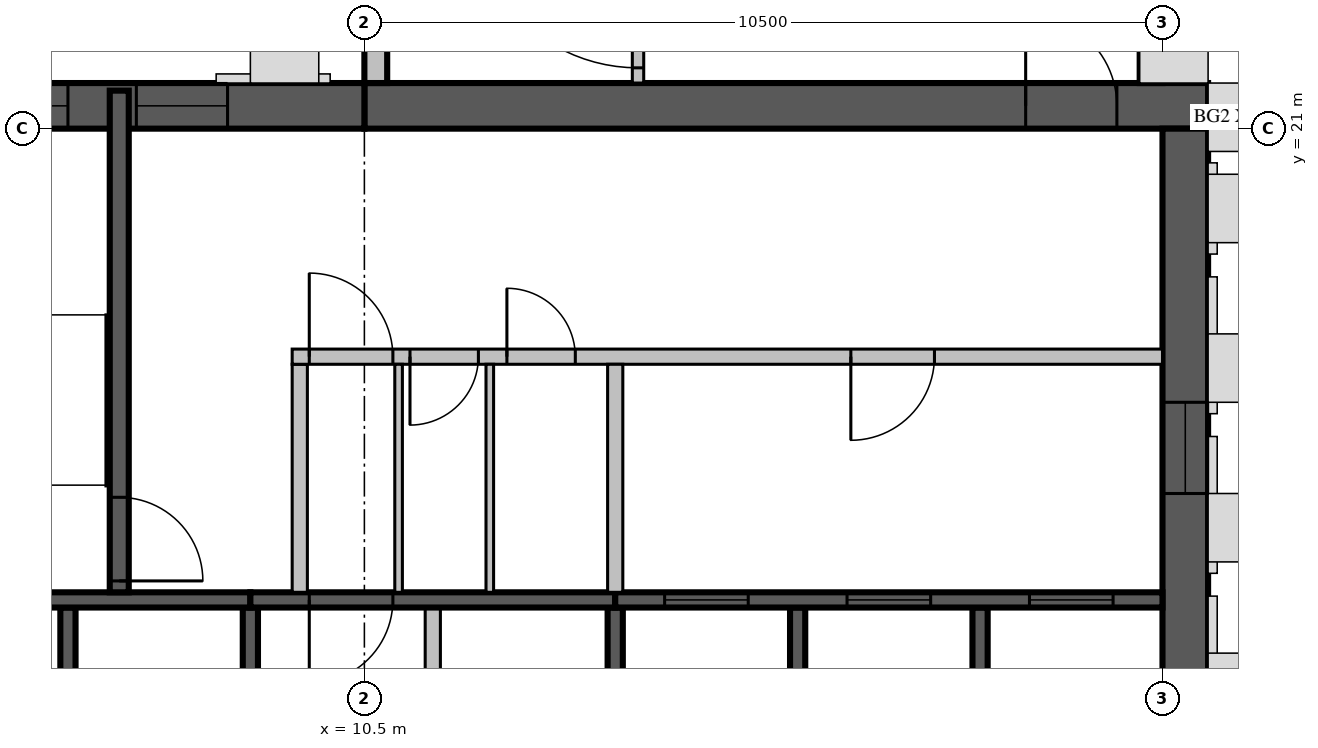
"""IFC4 building model, lengths in metres.
Left out: names, types, materials, properties, quantities, classifications, styles, units other than length and angle.
Written with IfcOpenShell. Run it as: python <this file> out.ifc"""

import sys

from ifc_helpers import new_model, si_unit, direction, frame, frame_2d, origin, place, context, subcontext, project, spatial, rectangle, extrude, source, transform, mapped, element, fill, save


model = new_model("IFC4")
c1 = context("Model", 3, precision=1e-05, world=origin(), true_north=direction((0.0, 1.0)))
c2 = subcontext(c1, "Body", "Model", "MODEL_VIEW")
j1 = project(units=[si_unit("LENGTHUNIT", "METRE"), si_unit("PLANEANGLEUNIT", "RADIAN")], contexts=[c1])
p1 = place(None, origin())
s1 = spatial("IfcSite", under=j1, at=p1, CompositionType="ELEMENT")
p2 = place(p1, origin())
s2 = spatial("IfcBuilding", under=s1, at=p2, CompositionType="ELEMENT")
p3 = place(p2, frame((0.0, 0.0, 333.5)))
s3 = spatial("IfcBuildingStorey", under=s2, at=p3, CompositionType="ELEMENT", Elevation=333.5)
m1 = source(origin(), c2, "Body", "SweptSolid", [
    extrude(rectangle(XDim=11.1, YDim=0.6, at=frame_2d((5.55, 0.0))), origin(), (0.0, 0.0, 1.0), 3.5),
])
p4 = place(p3, frame((10.5, 21.3, 0.0), z_axis=(0.0, 0.0, 1.0), x_axis=(1.0, 0.0, 0.0)))
e1 = element("IfcWall", 1, at=p4, inside=s3, PredefinedType="SHEAR", context=c2, shape_type="MappedRepresentation", body=[
    mapped(m1, transform((0.0, 0.0, 0.0), scale=1.0)),
])
m2 = source(origin(), c2, "Body", "SweptSolid", [
    extrude(rectangle(XDim=1.2, YDim=2.1, at=frame_2d((0.6, 1.05))), frame((0.0, 0.31, 0.0), z_axis=(0.0, -1.0, 0.0), x_axis=(1.0, 0.0, 0.0)), (0.0, 0.0, 1.0), 0.62),
])
p5 = place(p4, frame((8.7, 0.0, 0.0)))
e2 = element("IfcOpeningElement", 2, at=p5, cuts=e1, PredefinedType="OPENING", context=c2, shape_type="MappedRepresentation", body=[
    mapped(m2, transform((0.0, 0.0, 0.0), scale=1.0)),
])
p6 = place(p3, frame((21.3, 4.2, 0.0), z_axis=(0.0, 0.0, 1.0), x_axis=(0.0, 1.0, 0.0)))
e3 = element("IfcWall", 3, at=p6, inside=s3, PredefinedType="SHEAR", context=c2, shape_type="SweptSolid", body=[
    extrude(rectangle(XDim=16.8, YDim=0.6, at=frame_2d((8.4, 0.0))), origin(), (0.0, 0.0, 1.0), 3.5),
])
p7 = place(p6, frame((4.2, 0.0, 0.0)))
e4 = element("IfcOpeningElement", 4, at=p7, cuts=e3, PredefinedType="OPENING", context=c2, shape_type="MappedRepresentation", body=[
    mapped(m2, transform((0.0, 0.0, 0.0), scale=1.0)),
])
m3 = source(origin(), c2, "Body", "SweptSolid", [
    extrude(rectangle(XDim=1.2, YDim=2.4, at=frame_2d((0.6, 1.2))), frame((0.0, 0.31, 0.0), z_axis=(0.0, -1.0, 0.0), x_axis=(1.0, 0.0, 0.0)), (0.0, 0.0, 1.0), 0.62),
])
p8 = place(p6, frame((12.0, 0.0, 0.6)))
e5 = element("IfcOpeningElement", 5, at=p8, cuts=e3, PredefinedType="OPENING", context=c2, shape_type="MappedRepresentation", body=[
    mapped(m3, transform((0.0, 0.0, 0.0), scale=1.0)),
])
m4 = source(origin(), c2, "Body", "SweptSolid", [
    extrude(rectangle(XDim=6.6, YDim=0.6, at=frame_2d((3.3, 0.0))), origin(), (0.0, 0.0, 1.0), 3.5),
])
p9 = place(p3, frame((3.9, 21.3, 0.0), z_axis=(0.0, 0.0, 1.0), x_axis=(1.0, 0.0, 0.0)))
e6 = element("IfcWall", 6, at=p9, inside=s3, PredefinedType="SHEAR", context=c2, shape_type="MappedRepresentation", body=[
    mapped(m4, transform((0.0, 0.0, 0.0), scale=1.0)),
])
p10 = place(p9, frame((1.5, 0.0, 0.6)))
e7 = element("IfcOpeningElement", 7, at=p10, cuts=e6, PredefinedType="OPENING", context=c2, shape_type="MappedRepresentation", body=[
    mapped(m3, transform((0.0, 0.0, 0.0), scale=1.0)),
])
p11 = place(p9, frame((3.6, 0.0, 0.6)))
e8 = element("IfcOpeningElement", 8, at=p11, cuts=e6, PredefinedType="OPENING", context=c2, shape_type="MappedRepresentation", body=[
    mapped(m3, transform((0.0, 0.0, 0.0), scale=1.0)),
])
m5 = source(origin(), c2, "Body", "SweptSolid", [
    extrude(rectangle(XDim=7.5, YDim=0.3, at=frame_2d((3.75, 0.0))), origin(), (0.0, 0.0, 1.0), 3.1),
])
p12 = place(p3, frame((20.85, 21.6, 0.0), z_axis=(0.0, 0.0, 1.0), x_axis=(0.0, 1.0, 0.0)))
e9 = element("IfcWall", 9, at=p12, inside=s3, PredefinedType="STANDARD", context=c2, shape_type="MappedRepresentation", body=[
    mapped(m5, transform((0.0, 0.0, 0.0), scale=1.0)),
])
m6 = source(origin(), c2, "Body", "SweptSolid", [
    extrude(rectangle(XDim=1.8, YDim=2.0, at=frame_2d((0.9, 1.0))), frame((0.0, 0.16, 0.0), z_axis=(0.0, -1.0, 0.0), x_axis=(1.0, 0.0, 0.0)), (0.0, 0.0, 1.0), 0.32),
])
p13 = place(p12, frame((0.463, 0.0, 0.6)))
e10 = element("IfcOpeningElement", 10, at=p13, cuts=e9, PredefinedType="OPENING", context=c2, shape_type="MappedRepresentation", body=[
    mapped(m6, transform((0.0, 0.0, 0.0), scale=1.0)),
])
m7 = source(origin(), c2, "Body", "SweptSolid", [
    extrude(rectangle(XDim=3.0, YDim=2.0, at=frame_2d((1.5, 1.0))), frame((0.0, 0.16, 0.0), z_axis=(0.0, -1.0, 0.0), x_axis=(1.0, 0.0, 0.0)), (0.0, 0.0, 1.0), 0.32),
])
p14 = place(p12, frame((4.2, 0.0, 0.6)))
e11 = element("IfcOpeningElement", 11, at=p14, cuts=e9, PredefinedType="OPENING", context=c2, shape_type="MappedRepresentation", body=[
    mapped(m7, transform((0.0, 0.0, 0.0), scale=1.0)),
])
p15 = place(p3, frame((10.65, 29.1, 0.0), z_axis=(0.0, 0.0, 1.0), x_axis=(0.0, -1.0, 0.0)))
e12 = element("IfcWall", 12, at=p15, inside=s3, PredefinedType="STANDARD", context=c2, shape_type="MappedRepresentation", body=[
    mapped(m5, transform((0.0, 0.0, 0.0), scale=1.0)),
])
m8 = source(origin(), c2, "Body", "SweptSolid", [
    extrude(rectangle(XDim=3.6, YDim=2.0, at=frame_2d((1.8, 1.0))), frame((0.0, 0.16, 0.0), z_axis=(0.0, -1.0, 0.0), x_axis=(1.0, 0.0, 0.0)), (0.0, 0.0, 1.0), 0.32),
])
p16 = place(p15, frame((3.36, 0.0, 0.6)))
e13 = element("IfcOpeningElement", 13, at=p16, cuts=e12, PredefinedType="OPENING", context=c2, shape_type="MappedRepresentation", body=[
    mapped(m8, transform((0.0, 0.0, 0.0), scale=1.0)),
])
m9 = source(origin(), c2, "Body", "SweptSolid", [
    extrude(rectangle(XDim=2.4, YDim=2.0, at=frame_2d((1.2, 1.0))), frame((0.0, 0.16, 0.0), z_axis=(0.0, -1.0, 0.0), x_axis=(1.0, 0.0, 0.0)), (0.0, 0.0, 1.0), 0.32),
])
p17 = place(p15, frame((0.48, 0.0, 0.6)))
e14 = element("IfcOpeningElement", 14, at=p17, cuts=e12, PredefinedType="OPENING", context=c2, shape_type="MappedRepresentation", body=[
    mapped(m9, transform((0.0, 0.0, 0.0), scale=1.0)),
])
m10 = source(origin(), c2, "Body", "SweptSolid", [
    extrude(rectangle(XDim=3.0, YDim=0.2, at=frame_2d((1.5, 0.0))), origin(), (0.0, 0.0, 1.0), 3.5),
])
p18 = place(p3, frame((6.6, 11.7, 0.0), z_axis=(0.0, 0.0, 1.0), x_axis=(0.0, 1.0, 0.0)))
e15 = element("IfcWall", 15, at=p18, inside=s3, PredefinedType="SOLIDWALL", context=c2, shape_type="MappedRepresentation", body=[
    mapped(m10, transform((0.0, 0.0, 0.0), scale=1.0)),
])
m11 = source(origin(), c2, "Body", "SweptSolid", [
    extrude(rectangle(XDim=3.0, YDim=0.2, at=frame_2d((1.5, 0.0))), origin(), (0.0, 0.0, 1.0), 3.1),
])
for number, where, z_axis, x_axis in (
    (16, (9.0, 11.7, 0.0), (0.0, 0.0, 1.0), (0.0, 1.0, 0.0)),
    (17, (13.8, 11.7, 0.0), (0.0, 0.0, 1.0), (0.0, 1.0, 0.0)),
):
    element("IfcWall", number, at=place(p3, frame(where, z_axis=z_axis, x_axis=x_axis)), inside=s3, PredefinedType="SOLIDWALL", context=c2, shape_type="MappedRepresentation", body=[
        mapped(m11, transform((0.0, 0.0, 0.0), scale=1.0)),
    ])
for number, where, z_axis, x_axis in (
    (18, (16.2, 11.7, 0.0), (0.0, 0.0, 1.0), (0.0, 1.0, 0.0)),
    (19, (18.6, 11.7, 0.0), (0.0, 0.0, 1.0), (0.0, 1.0, 0.0)),
):
    element("IfcWall", number, at=place(p3, frame(where, z_axis=z_axis, x_axis=x_axis)), inside=s3, PredefinedType="SOLIDWALL", context=c2, shape_type="MappedRepresentation", body=[
        mapped(m10, transform((0.0, 0.0, 0.0), scale=1.0)),
    ])
m12 = source(origin(), c2, "Body", "SweptSolid", [
    extrude(rectangle(XDim=3.0, YDim=0.2, at=frame_2d((1.5, 0.0))), origin(), (0.0, 0.0, 1.0), 3.1),
])
p19 = place(p3, frame((11.4, 11.7, 0.0), z_axis=(0.0, 0.0, 1.0), x_axis=(0.0, 1.0, 0.0)))
e20 = element("IfcWall", 20, at=p19, inside=s3, PredefinedType="PARTITIONING", context=c2, shape_type="MappedRepresentation", body=[
    mapped(m12, transform((0.0, 0.0, 0.0), scale=1.0)),
])
m13 = source(origin(), c2, "Body", "SweptSolid", [
    extrude(rectangle(XDim=4.8, YDim=0.2, at=frame_2d((2.4, 0.0))), origin(), (0.0, 0.0, 1.0), 3.5),
])
p20 = place(p3, frame((4.2, 14.8, 0.0), z_axis=(0.0, 0.0, 1.0), x_axis=(1.0, 0.0, 0.0)))
e21 = element("IfcWall", 21, at=p20, inside=s3, PredefinedType="SOLIDWALL", context=c2, shape_type="MappedRepresentation", body=[
    mapped(m13, transform((0.0, 0.0, 0.0), scale=1.0)),
])
m14 = source(origin(), c2, "Body", "SweptSolid", [
    extrude(rectangle(XDim=4.8, YDim=0.2, at=frame_2d((2.4, 0.0))), origin(), (0.0, 0.0, 1.0), 3.1),
])
p21 = place(p3, frame((9.0, 14.8, 0.0), z_axis=(0.0, 0.0, 1.0), x_axis=(1.0, 0.0, 0.0)))
e22 = element("IfcWall", 22, at=p21, inside=s3, PredefinedType="SOLIDWALL", context=c2, shape_type="MappedRepresentation", body=[
    mapped(m14, transform((0.0, 0.0, 0.0), scale=1.0)),
])
m15 = source(origin(), c2, "Body", "SweptSolid", [
    extrude(rectangle(XDim=1.1, YDim=2.1, at=frame_2d((0.55, 1.05))), frame((0.0, 0.11, 0.0), z_axis=(0.0, -1.0, 0.0), x_axis=(1.0, 0.0, 0.0)), (0.0, 0.0, 1.0), 0.22),
])
p22 = place(p21, frame((0.775, 0.0, 0.0)))
e23 = element("IfcOpeningElement", 23, at=p22, cuts=e22, PredefinedType="OPENING", context=c2, shape_type="MappedRepresentation", body=[
    mapped(m15, transform((0.0, 0.0, 0.0), scale=1.0)),
])
m16 = source(origin(), c2, "Body", "SweptSolid", [
    extrude(rectangle(XDim=7.2, YDim=0.2, at=frame_2d((3.6, 0.0))), origin(), (0.0, 0.0, 1.0), 3.5),
])
p23 = place(p3, frame((13.8, 14.8, 0.0), z_axis=(0.0, 0.0, 1.0), x_axis=(1.0, 0.0, 0.0)))
e24 = element("IfcWall", 24, at=p23, inside=s3, PredefinedType="SOLIDWALL", context=c2, shape_type="MappedRepresentation", body=[
    mapped(m16, transform((0.0, 0.0, 0.0), scale=1.0)),
])
p24 = place(p23, frame((0.65, 0.0, 0.0)))
e25 = element("IfcOpeningElement", 25, at=p24, cuts=e24, PredefinedType="OPENING", context=c2, shape_type="MappedRepresentation", body=[
    mapped(m15, transform((0.0, 0.0, 0.0), scale=1.0)),
])
p25 = place(p23, frame((3.05, 0.0, 0.0)))
e26 = element("IfcOpeningElement", 26, at=p25, cuts=e24, PredefinedType="OPENING", context=c2, shape_type="MappedRepresentation", body=[
    mapped(m15, transform((0.0, 0.0, 0.0), scale=1.0)),
])
p26 = place(p23, frame((5.45, 0.0, 0.0)))
e27 = element("IfcOpeningElement", 27, at=p26, cuts=e24, PredefinedType="OPENING", context=c2, shape_type="MappedRepresentation", body=[
    mapped(m15, transform((0.0, 0.0, 0.0), scale=1.0)),
])
m17 = source(origin(), c2, "Body", "SweptSolid", [
    extrude(rectangle(XDim=6.6, YDim=0.25, at=frame_2d((3.3, 0.0))), origin(), (0.0, 0.0, 1.0), 3.1),
])
p27 = place(p3, frame((7.275, 14.9, 0.0), z_axis=(0.0, 0.0, 1.0), x_axis=(0.0, 1.0, 0.0)))
e28 = element("IfcWall", 28, at=p27, inside=s3, PredefinedType="SOLIDWALL", context=c2, shape_type="MappedRepresentation", body=[
    mapped(m17, transform((0.0, 0.0, 0.0), scale=1.0)),
])
m18 = source(origin(), c2, "Body", "SweptSolid", [
    extrude(rectangle(XDim=1.1, YDim=2.1, at=frame_2d((0.55, 1.05))), frame((0.0, 0.135, 0.0), z_axis=(0.0, -1.0, 0.0), x_axis=(1.0, 0.0, 0.0)), (0.0, 0.0, 1.0), 0.27),
])
p28 = place(p27, frame((0.15, 0.0, 0.0)))
e29 = element("IfcOpeningElement", 29, at=p28, cuts=e28, PredefinedType="OPENING", context=c2, shape_type="MappedRepresentation", body=[
    mapped(m18, transform((0.0, 0.0, 0.0), scale=1.0)),
])
p29 = place(p3, frame((9.65, 14.9, 0.0), z_axis=(0.0, 0.0, 1.0), x_axis=(0.0, 1.0, 0.0)))
e30 = element("IfcWall", 30, at=p29, inside=s3, PredefinedType="PARTITIONING", context=c2, shape_type="MappedRepresentation", body=[
    mapped(m12, transform((0.0, 0.0, 0.0), scale=1.0)),
])
m19 = source(origin(), c2, "Body", "SweptSolid", [
    extrude(rectangle(XDim=11.45, YDim=0.2, at=frame_2d((5.725, 0.0))), origin(), (0.0, 0.0, 1.0), 3.1),
])
p30 = place(p3, frame((9.55, 18.0, 0.0), z_axis=(0.0, 0.0, 1.0), x_axis=(1.0, 0.0, 0.0)))
e31 = element("IfcWall", 31, at=p30, inside=s3, PredefinedType="PARTITIONING", context=c2, shape_type="MappedRepresentation", body=[
    mapped(m19, transform((0.0, 0.0, 0.0), scale=1.0)),
])
p31 = place(p30, frame((0.225, 0.0, 0.0)))
e32 = element("IfcOpeningElement", 32, at=p31, cuts=e31, PredefinedType="OPENING", context=c2, shape_type="MappedRepresentation", body=[
    mapped(m15, transform((0.0, 0.0, 0.0), scale=1.0)),
])
m20 = source(origin(), c2, "Body", "SweptSolid", [
    extrude(rectangle(XDim=0.9, YDim=2.1, at=frame_2d((0.45, 1.05))), frame((0.0, 0.11, 0.0), z_axis=(0.0, -1.0, 0.0), x_axis=(1.0, 0.0, 0.0)), (0.0, 0.0, 1.0), 0.22),
])
p32 = place(p30, frame((1.55, 0.0, 0.0)))
e33 = element("IfcOpeningElement", 33, at=p32, cuts=e31, PredefinedType="OPENING", context=c2, shape_type="MappedRepresentation", body=[
    mapped(m20, transform((0.0, 0.0, 0.0), scale=1.0)),
])
p33 = place(p30, frame((2.825, 0.0, 0.0)))
e34 = element("IfcOpeningElement", 34, at=p33, cuts=e31, PredefinedType="OPENING", context=c2, shape_type="MappedRepresentation", body=[
    mapped(m20, transform((0.0, 0.0, 0.0), scale=1.0)),
])
p34 = place(p30, frame((7.35, 0.0, 0.0)))
e35 = element("IfcOpeningElement", 35, at=p34, cuts=e31, PredefinedType="OPENING", context=c2, shape_type="MappedRepresentation", body=[
    mapped(m15, transform((0.0, 0.0, 0.0), scale=1.0)),
])
p35 = place(p3, frame((13.8, 14.9, 0.0), z_axis=(0.0, 0.0, 1.0), x_axis=(0.0, 1.0, 0.0)))
e36 = element("IfcWall", 36, at=p35, inside=s3, PredefinedType="PARTITIONING", context=c2, shape_type="MappedRepresentation", body=[
    mapped(m12, transform((0.0, 0.0, 0.0), scale=1.0)),
])
m21 = source(origin(), c2, "Body", "SweptSolid", [
    extrude(rectangle(XDim=3.0, YDim=0.1, at=frame_2d((1.5, 0.0))), origin(), (0.0, 0.0, 1.0), 3.1),
])
for number, where, z_axis, x_axis in (
    (37, (10.95, 14.9, 0.0), (0.0, 0.0, 1.0), (0.0, 1.0, 0.0)),
    (38, (12.15, 14.9, 0.0), (0.0, 0.0, 1.0), (0.0, 1.0, 0.0)),
):
    element("IfcWall", number, at=place(p3, frame(where, z_axis=z_axis, x_axis=x_axis)), inside=s3, PredefinedType="PARTITIONING", context=c2, shape_type="MappedRepresentation", body=[
        mapped(m21, transform((0.0, 0.0, 0.0), scale=1.0)),
    ])
m22 = source(origin(), c2, "Body", "SweptSolid", [
    extrude(rectangle(XDim=7.725, YDim=0.15, at=frame_2d((3.862, 0.0))), origin(), (0.0, 0.0, 1.0), 3.1),
])
p36 = place(p3, frame((14.1, 29.325, 0.0), z_axis=(0.0, 0.0, 1.0), x_axis=(0.0, -1.0, 0.0)))
e39 = element("IfcWall", 39, at=p36, inside=s3, PredefinedType="PARTITIONING", context=c2, shape_type="MappedRepresentation", body=[
    mapped(m22, transform((0.0, 0.0, 0.0), scale=1.0)),
])
m23 = source(origin(), c2, "Body", "SweptSolid", [
    extrude(rectangle(XDim=2.2, YDim=2.1, at=frame_2d((1.1, 1.05))), frame((0.0, 0.085, 0.0), z_axis=(0.0, -1.0, 0.0), x_axis=(1.0, 0.0, 0.0)), (0.0, 0.0, 1.0), 0.17),
])
p37 = place(p36, frame((5.325, 0.0, 0.0)))
e40 = element("IfcOpeningElement", 40, at=p37, cuts=e39, PredefinedType="OPENING", context=c2, shape_type="MappedRepresentation", body=[
    mapped(m23, transform((0.0, 0.0, 0.0), scale=1.0)),
])
m24 = source(origin(), c2, "Body", "SweptSolid", [
    extrude(rectangle(XDim=1.1, YDim=2.1, at=frame_2d((0.55, 1.05))), frame((0.0, 0.025, 0.0), z_axis=(0.0, -1.0, 0.0), x_axis=(1.0, 0.0, 0.0)), (0.0, 0.0, 1.0), 0.05),
])
p38 = place(p22, origin())
e41 = element("IfcDoor", 41, at=p38, inside=s3, OperationType="SINGLE_SWING_RIGHT", PredefinedType="DOOR", context=c2, shape_type="MappedRepresentation", body=[
    mapped(m24, transform((0.0, 0.0, 0.0), scale=1.0)),
])
fill(e23, e41)
p39 = place(p24, origin())
e42 = element("IfcDoor", 42, at=p39, inside=s3, OperationType="SLIDING_TO_LEFT", PredefinedType="DOOR", context=c2, shape_type="MappedRepresentation", body=[
    mapped(m24, transform((0.0, 0.0, 0.0), scale=1.0)),
])
fill(e25, e42)
p40 = place(p25, origin())
e43 = element("IfcDoor", 43, at=p40, inside=s3, OperationType="SLIDING_TO_LEFT", PredefinedType="DOOR", context=c2, shape_type="MappedRepresentation", body=[
    mapped(m24, transform((0.0, 0.0, 0.0), scale=1.0)),
])
fill(e26, e43)
p41 = place(p26, origin())
e44 = element("IfcDoor", 44, at=p41, inside=s3, OperationType="SLIDING_TO_LEFT", PredefinedType="DOOR", context=c2, shape_type="MappedRepresentation", body=[
    mapped(m24, transform((0.0, 0.0, 0.0), scale=1.0)),
])
fill(e27, e44)
p42 = place(p28, origin())
e45 = element("IfcDoor", 45, at=p42, inside=s3, OperationType="SINGLE_SWING_RIGHT", PredefinedType="DOOR", context=c2, shape_type="MappedRepresentation", body=[
    mapped(m24, transform((0.0, 0.0, 0.0), scale=1.0)),
])
fill(e29, e45)
p43 = place(p31, origin())
e46 = element("IfcDoor", 46, at=p43, inside=s3, OperationType="SINGLE_SWING_LEFT", PredefinedType="DOOR", context=c2, shape_type="MappedRepresentation", body=[
    mapped(m24, transform((0.0, 0.0, 0.0), scale=1.0)),
])
fill(e32, e46)
m25 = source(origin(), c2, "Body", "SweptSolid", [
    extrude(rectangle(XDim=0.9, YDim=2.1, at=frame_2d((0.45, 1.05))), frame((0.0, 0.025, 0.0), z_axis=(0.0, -1.0, 0.0), x_axis=(1.0, 0.0, 0.0)), (0.0, 0.0, 1.0), 0.05),
])
p44 = place(p32, origin())
e47 = element("IfcDoor", 47, at=p44, inside=s3, OperationType="SINGLE_SWING_RIGHT", PredefinedType="DOOR", context=c2, shape_type="MappedRepresentation", body=[
    mapped(m25, transform((0.0, 0.0, 0.0), scale=1.0)),
])
fill(e33, e47)
p45 = place(p33, origin())
e48 = element("IfcDoor", 48, at=p45, inside=s3, OperationType="SINGLE_SWING_LEFT", PredefinedType="DOOR", context=c2, shape_type="MappedRepresentation", body=[
    mapped(m25, transform((0.0, 0.0, 0.0), scale=1.0)),
])
fill(e34, e48)
p46 = place(p34, origin())
e49 = element("IfcDoor", 49, at=p46, inside=s3, OperationType="SINGLE_SWING_RIGHT", PredefinedType="DOOR", context=c2, shape_type="MappedRepresentation", body=[
    mapped(m24, transform((0.0, 0.0, 0.0), scale=1.0)),
])
fill(e35, e49)
m26 = source(origin(), c2, "Body", "SweptSolid", [
    extrude(rectangle(XDim=1.2, YDim=2.1, at=frame_2d((0.6, 1.05))), frame((0.0, 0.025, 0.0), z_axis=(0.0, -1.0, 0.0), x_axis=(1.0, 0.0, 0.0)), (0.0, 0.0, 1.0), 0.05),
])
p47 = place(p5, origin())
e50 = element("IfcDoor", 50, at=p47, inside=s3, OperationType="SINGLE_SWING_LEFT", PredefinedType="DOOR", context=c2, shape_type="MappedRepresentation", body=[
    mapped(m26, transform((0.0, 0.0, 0.0), scale=1.0)),
])
fill(e2, e50)
m27 = source(origin(), c2, "Body", "SweptSolid", [
    extrude(rectangle(XDim=1.2, YDim=2.4, at=frame_2d((0.6, 1.2))), frame((0.0, 0.03, 0.0), z_axis=(0.0, -1.0, 0.0), x_axis=(1.0, 0.0, 0.0)), (0.0, 0.0, 1.0), 0.06),
])
p48 = place(p8, origin())
e51 = element("IfcWindow", 51, at=p48, inside=s3, PartitioningType="SINGLE_PANEL", PredefinedType="WINDOW", context=c2, shape_type="MappedRepresentation", body=[
    mapped(m27, transform((0.0, 0.0, 0.0), scale=1.0)),
])
fill(e5, e51)
p49 = place(p10, origin())
e52 = element("IfcWindow", 52, at=p49, inside=s3, PartitioningType="SINGLE_PANEL", PredefinedType="WINDOW", context=c2, shape_type="MappedRepresentation", body=[
    mapped(m27, transform((0.0, 0.0, 0.0), scale=1.0)),
])
fill(e7, e52)
p50 = place(p11, origin())
e53 = element("IfcWindow", 53, at=p50, inside=s3, PartitioningType="SINGLE_PANEL", PredefinedType="WINDOW", context=c2, shape_type="MappedRepresentation", body=[
    mapped(m27, transform((0.0, 0.0, 0.0), scale=1.0)),
])
fill(e8, e53)
m28 = source(origin(), c2, "Body", "SweptSolid", [
    extrude(rectangle(XDim=2.2, YDim=2.1, at=frame_2d((1.1, 1.05))), frame((0.0, 0.025, 0.0), z_axis=(0.0, -1.0, 0.0), x_axis=(1.0, 0.0, 0.0)), (0.0, 0.0, 1.0), 0.05),
])
p51 = place(p37, origin())
e54 = element("IfcDoor", 54, at=p51, inside=s3, OperationType="DOUBLE_DOOR_SINGLE_SWING", PredefinedType="DOOR", context=c2, shape_type="MappedRepresentation", body=[
    mapped(m28, transform((0.0, 0.0, 0.0), scale=1.0)),
])
fill(e40, e54)
save(model, sys.argv[1])
